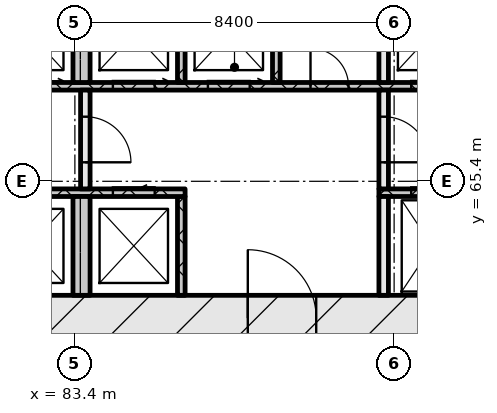
"""IFC4 building model, lengths in metres.
Left out: names, types, materials, properties, quantities, classifications, styles, units other than length and angle.
Written with IfcOpenShell. Run it as: python <this file> out.ifc"""

import sys

from ifc_helpers import new_model, si_unit, direction, frame, frame_2d, origin, place, context, subcontext, project, spatial, rectangle, extrude, element, fill, save


model = new_model("IFC4")
c1 = context("Model", 3, precision=1e-05, world=origin(), true_north=direction((0.0, 1.0)))
c2 = subcontext(c1, "Body", "Model", "MODEL_VIEW")
j1 = project(units=[si_unit("LENGTHUNIT", "METRE"), si_unit("PLANEANGLEUNIT", "RADIAN")], contexts=[c1])
p1 = place(None, origin())
s1 = spatial("IfcSite", under=j1, at=p1, CompositionType="ELEMENT")
p2 = place(p1, origin())
s2 = spatial("IfcBuilding", under=s1, at=p2, CompositionType="ELEMENT")
p3 = place(p2, origin())
s3 = spatial("IfcBuildingStorey", under=s2, at=p3, CompositionType="ELEMENT", Elevation=0.0)
p4 = place(p3, frame((66.6, 61.8, 0.0), z_axis=(0.0, 0.0, 1.0), x_axis=(1.0, 0.0, 0.0)))
e1 = element("IfcWall", 1, at=p4, inside=s3, PredefinedType="SOLIDWALL", context=c2, shape_type="SweptSolid", body=[
    extrude(rectangle(XDim=42.0, YDim=1.2, at=frame_2d((21.0, 0.0))), origin(), (0.0, 0.0, 1.0), 8.7),
])
p5 = place(p4, frame((21.35, 0.0, 0.0)))
e2 = element("IfcOpeningElement", 2, at=p5, cuts=e1, PredefinedType="OPENING", context=c2, shape_type="SweptSolid", body=[
    extrude(rectangle(XDim=1.8, YDim=2.1, at=frame_2d((0.9, 1.05))), frame((0.0, 0.61, 0.0), z_axis=(0.0, -1.0, 0.0), x_axis=(1.0, 0.0, 0.0)), (0.0, 0.0, 1.0), 1.22),
])
p6 = place(p3, frame((83.575, 62.4, 0.0), z_axis=(0.0, 0.0, 1.0), x_axis=(0.0, 1.0, 0.0)))
e3 = element("IfcWall", 3, at=p6, inside=s3, PredefinedType="SOLIDWALL", context=c2, shape_type="SweptSolid", body=[
    extrude(rectangle(XDim=2.6, YDim=0.45, at=frame_2d((1.3, 0.0))), origin(), (0.0, 0.0, 1.0), 8.7),
])
p7 = place(p3, frame((86.2, 62.4, 0.0), z_axis=(0.0, 0.0, 1.0), x_axis=(0.0, 1.0, 0.0)))
e4 = element("IfcWall", 4, at=p7, inside=s3, PredefinedType="SOLIDWALL", context=c2, shape_type="SweptSolid", body=[
    extrude(rectangle(XDim=2.6, YDim=0.2, at=frame_2d((1.3, 0.0))), origin(), (0.0, 0.0, 1.0), 8.7),
])
p8 = place(p3, frame((91.525, 62.4, 0.0), z_axis=(0.0, 0.0, 1.0), x_axis=(0.0, 1.0, 0.0)))
e5 = element("IfcWall", 5, at=p8, inside=s3, PredefinedType="SOLIDWALL", context=c2, shape_type="SweptSolid", body=[
    extrude(rectangle(XDim=2.6, YDim=0.25, at=frame_2d((1.3, 0.0))), origin(), (0.0, 0.0, 1.0), 8.7),
])
p9 = place(p3, frame((67.8, 65.1, 0.0), z_axis=(0.0, 0.0, 1.0), x_axis=(1.0, 0.0, 0.0)))
e6 = element("IfcWall", 6, at=p9, inside=s3, PredefinedType="SOLIDWALL", context=c2, shape_type="SweptSolid", body=[
    extrude(rectangle(XDim=18.5, YDim=0.2, at=frame_2d((9.25, 0.0))), origin(), (0.0, 0.0, 1.0), 8.7),
])
p10 = place(p9, frame((7.27, 0.0, 0.0)))
e7 = element("IfcOpeningElement", 7, at=p10, cuts=e6, PredefinedType="OPENING", context=c2, shape_type="SweptSolid", body=[
    extrude(rectangle(XDim=0.9, YDim=2.1, at=frame_2d((0.45, 1.05))), frame((0.0, 0.11, 0.0), z_axis=(0.0, -1.0, 0.0), x_axis=(1.0, 0.0, 0.0)), (0.0, 0.0, 1.0), 0.22),
])
p11 = place(p9, frame((8.85, 0.0, 0.0)))
e8 = element("IfcOpeningElement", 8, at=p11, cuts=e6, PredefinedType="OPENING", context=c2, shape_type="SweptSolid", body=[
    extrude(rectangle(XDim=1.1, YDim=2.1, at=frame_2d((0.55, 1.05))), frame((0.0, 0.11, 0.0), z_axis=(0.0, -1.0, 0.0), x_axis=(1.0, 0.0, 0.0)), (0.0, 0.0, 1.0), 0.22),
])
p12 = place(p9, frame((11.35, 0.0, 0.0)))
e9 = element("IfcOpeningElement", 9, at=p12, cuts=e6, PredefinedType="OPENING", context=c2, shape_type="SweptSolid", body=[
    extrude(rectangle(XDim=1.1, YDim=2.1, at=frame_2d((0.55, 1.05))), frame((0.0, 0.11, 0.0), z_axis=(0.0, -1.0, 0.0), x_axis=(1.0, 0.0, 0.0)), (0.0, 0.0, 1.0), 0.22),
])
p13 = place(p9, frame((13.85, 0.0, 0.0)))
e10 = element("IfcOpeningElement", 10, at=p13, cuts=e6, PredefinedType="OPENING", context=c2, shape_type="SweptSolid", body=[
    extrude(rectangle(XDim=1.1, YDim=2.1, at=frame_2d((0.55, 1.05))), frame((0.0, 0.11, 0.0), z_axis=(0.0, -1.0, 0.0), x_axis=(1.0, 0.0, 0.0)), (0.0, 0.0, 1.0), 0.22),
])
p14 = place(p9, frame((16.6, 0.0, 0.0)))
e11 = element("IfcOpeningElement", 11, at=p14, cuts=e6, PredefinedType="OPENING", context=c2, shape_type="SweptSolid", body=[
    extrude(rectangle(XDim=1.1, YDim=2.1, at=frame_2d((0.55, 1.05))), frame((0.0, 0.11, 0.0), z_axis=(0.0, -1.0, 0.0), x_axis=(1.0, 0.0, 0.0)), (0.0, 0.0, 1.0), 0.22),
])
p15 = place(p3, frame((91.4, 65.1, 0.0), z_axis=(0.0, 0.0, 1.0), x_axis=(1.0, 0.0, 0.0)))
e12 = element("IfcWall", 12, at=p15, inside=s3, PredefinedType="SOLIDWALL", context=c2, shape_type="SweptSolid", body=[
    extrude(rectangle(XDim=16.0, YDim=0.2, at=frame_2d((8.0, 0.0))), origin(), (0.0, 0.0, 1.0), 8.7),
])
p16 = place(p15, frame((0.85, 0.0, 0.0)))
e13 = element("IfcOpeningElement", 13, at=p16, cuts=e12, PredefinedType="OPENING", context=c2, shape_type="SweptSolid", body=[
    extrude(rectangle(XDim=1.1, YDim=2.1, at=frame_2d((0.55, 1.05))), frame((0.0, 0.11, 0.0), z_axis=(0.0, -1.0, 0.0), x_axis=(1.0, 0.0, 0.0)), (0.0, 0.0, 1.0), 0.22),
])
p17 = place(p15, frame((3.35, 0.0, 0.0)))
e14 = element("IfcOpeningElement", 14, at=p17, cuts=e12, PredefinedType="OPENING", context=c2, shape_type="SweptSolid", body=[
    extrude(rectangle(XDim=1.1, YDim=2.1, at=frame_2d((0.55, 1.05))), frame((0.0, 0.11, 0.0), z_axis=(0.0, -1.0, 0.0), x_axis=(1.0, 0.0, 0.0)), (0.0, 0.0, 1.0), 0.22),
])
p18 = place(p15, frame((5.85, 0.0, 0.0)))
e15 = element("IfcOpeningElement", 15, at=p18, cuts=e12, PredefinedType="OPENING", context=c2, shape_type="SweptSolid", body=[
    extrude(rectangle(XDim=1.1, YDim=2.1, at=frame_2d((0.55, 1.05))), frame((0.0, 0.11, 0.0), z_axis=(0.0, -1.0, 0.0), x_axis=(1.0, 0.0, 0.0)), (0.0, 0.0, 1.0), 0.22),
])
p19 = place(p15, frame((7.83, 0.0, 0.0)))
e16 = element("IfcOpeningElement", 16, at=p19, cuts=e12, PredefinedType="OPENING", context=c2, shape_type="SweptSolid", body=[
    extrude(rectangle(XDim=0.9, YDim=2.1, at=frame_2d((0.45, 1.05))), frame((0.0, 0.11, 0.0), z_axis=(0.0, -1.0, 0.0), x_axis=(1.0, 0.0, 0.0)), (0.0, 0.0, 1.0), 0.22),
])
p20 = place(p3, frame((83.675, 65.2, 0.0), z_axis=(0.0, 0.0, 1.0), x_axis=(0.0, 1.0, 0.0)))
e17 = element("IfcWall", 17, at=p20, inside=s3, PredefinedType="SOLIDWALL", context=c2, shape_type="SweptSolid", body=[
    extrude(rectangle(XDim=2.6, YDim=0.25, at=frame_2d((1.3, 0.0))), origin(), (0.0, 0.0, 1.0), 8.7),
])
p21 = place(p20, frame((0.7, 0.0, 0.0)))
e18 = element("IfcOpeningElement", 18, at=p21, cuts=e17, PredefinedType="OPENING", context=c2, shape_type="SweptSolid", body=[
    extrude(rectangle(XDim=1.2, YDim=2.1, at=frame_2d((0.6, 1.05))), frame((0.0, 0.135, 0.0), z_axis=(0.0, -1.0, 0.0), x_axis=(1.0, 0.0, 0.0)), (0.0, 0.0, 1.0), 0.27),
])
p22 = place(p3, frame((91.525, 65.2, 0.0), z_axis=(0.0, 0.0, 1.0), x_axis=(0.0, 1.0, 0.0)))
e19 = element("IfcWall", 19, at=p22, inside=s3, PredefinedType="SOLIDWALL", context=c2, shape_type="SweptSolid", body=[
    extrude(rectangle(XDim=2.6, YDim=0.25, at=frame_2d((1.3, 0.0))), origin(), (0.0, 0.0, 1.0), 8.7),
])
p23 = place(p22, frame((0.7, 0.0, 0.0)))
e20 = element("IfcOpeningElement", 20, at=p23, cuts=e19, PredefinedType="OPENING", context=c2, shape_type="SweptSolid", body=[
    extrude(rectangle(XDim=1.2, YDim=2.1, at=frame_2d((0.6, 1.05))), frame((0.0, 0.135, 0.0), z_axis=(0.0, -1.0, 0.0), x_axis=(1.0, 0.0, 0.0)), (0.0, 0.0, 1.0), 0.27),
])
p24 = place(p3, frame((76.05, 67.9, 0.0), z_axis=(0.0, 0.0, 1.0), x_axis=(1.0, 0.0, 0.0)))
e21 = element("IfcWall", 21, at=p24, inside=s3, PredefinedType="SOLIDWALL", context=c2, shape_type="SweptSolid", body=[
    extrude(rectangle(XDim=23.1, YDim=0.2, at=frame_2d((11.55, 0.0))), origin(), (0.0, 0.0, 1.0), 8.7),
])
p25 = place(p24, frame((0.6, 0.0, 0.0)))
e22 = element("IfcOpeningElement", 22, at=p25, cuts=e21, PredefinedType="OPENING", context=c2, shape_type="SweptSolid", body=[
    extrude(rectangle(XDim=1.1, YDim=2.1, at=frame_2d((0.55, 1.05))), frame((0.0, 0.11, 0.0), z_axis=(0.0, -1.0, 0.0), x_axis=(1.0, 0.0, 0.0)), (0.0, 0.0, 1.0), 0.22),
])
p26 = place(p24, frame((3.1, 0.0, 0.0)))
e23 = element("IfcOpeningElement", 23, at=p26, cuts=e21, PredefinedType="OPENING", context=c2, shape_type="SweptSolid", body=[
    extrude(rectangle(XDim=1.1, YDim=2.1, at=frame_2d((0.55, 1.05))), frame((0.0, 0.11, 0.0), z_axis=(0.0, -1.0, 0.0), x_axis=(1.0, 0.0, 0.0)), (0.0, 0.0, 1.0), 0.22),
])
p27 = place(p24, frame((5.6, 0.0, 0.0)))
e24 = element("IfcOpeningElement", 24, at=p27, cuts=e21, PredefinedType="OPENING", context=c2, shape_type="SweptSolid", body=[
    extrude(rectangle(XDim=1.1, YDim=2.1, at=frame_2d((0.55, 1.05))), frame((0.0, 0.11, 0.0), z_axis=(0.0, -1.0, 0.0), x_axis=(1.0, 0.0, 0.0)), (0.0, 0.0, 1.0), 0.22),
])
p28 = place(p24, frame((8.35, 0.0, 0.0)))
e25 = element("IfcOpeningElement", 25, at=p28, cuts=e21, PredefinedType="OPENING", context=c2, shape_type="SweptSolid", body=[
    extrude(rectangle(XDim=1.1, YDim=2.1, at=frame_2d((0.55, 1.05))), frame((0.0, 0.11, 0.0), z_axis=(0.0, -1.0, 0.0), x_axis=(1.0, 0.0, 0.0)), (0.0, 0.0, 1.0), 0.22),
])
p29 = place(p24, frame((10.85, 0.0, 0.0)))
e26 = element("IfcOpeningElement", 26, at=p29, cuts=e21, PredefinedType="OPENING", context=c2, shape_type="SweptSolid", body=[
    extrude(rectangle(XDim=1.1, YDim=2.1, at=frame_2d((0.55, 1.05))), frame((0.0, 0.11, 0.0), z_axis=(0.0, -1.0, 0.0), x_axis=(1.0, 0.0, 0.0)), (0.0, 0.0, 1.0), 0.22),
])
p30 = place(p24, frame((13.55, 0.0, 0.0)))
e27 = element("IfcOpeningElement", 27, at=p30, cuts=e21, PredefinedType="OPENING", context=c2, shape_type="SweptSolid", body=[
    extrude(rectangle(XDim=1.0, YDim=2.1, at=frame_2d((0.5, 1.05))), frame((0.0, 0.11, 0.0), z_axis=(0.0, -1.0, 0.0), x_axis=(1.0, 0.0, 0.0)), (0.0, 0.0, 1.0), 0.22),
])
p31 = place(p24, frame((16.2, 0.0, 0.0)))
e28 = element("IfcOpeningElement", 28, at=p31, cuts=e21, PredefinedType="OPENING", context=c2, shape_type="SweptSolid", body=[
    extrude(rectangle(XDim=1.1, YDim=2.1, at=frame_2d((0.55, 1.05))), frame((0.0, 0.11, 0.0), z_axis=(0.0, -1.0, 0.0), x_axis=(1.0, 0.0, 0.0)), (0.0, 0.0, 1.0), 0.22),
])
p32 = place(p24, frame((18.7, 0.0, 0.0)))
e29 = element("IfcOpeningElement", 29, at=p32, cuts=e21, PredefinedType="OPENING", context=c2, shape_type="SweptSolid", body=[
    extrude(rectangle(XDim=1.1, YDim=2.1, at=frame_2d((0.55, 1.05))), frame((0.0, 0.11, 0.0), z_axis=(0.0, -1.0, 0.0), x_axis=(1.0, 0.0, 0.0)), (0.0, 0.0, 1.0), 0.22),
])
p33 = place(p24, frame((21.2, 0.0, 0.0)))
e30 = element("IfcOpeningElement", 30, at=p33, cuts=e21, PredefinedType="OPENING", context=c2, shape_type="SweptSolid", body=[
    extrude(rectangle(XDim=1.1, YDim=2.1, at=frame_2d((0.55, 1.05))), frame((0.0, 0.11, 0.0), z_axis=(0.0, -1.0, 0.0), x_axis=(1.0, 0.0, 0.0)), (0.0, 0.0, 1.0), 0.22),
])
p34 = place(p3, frame((83.575, 68.0, 0.0), z_axis=(0.0, 0.0, 1.0), x_axis=(0.0, 1.0, 0.0)))
e31 = element("IfcWall", 31, at=p34, inside=s3, PredefinedType="SOLIDWALL", context=c2, shape_type="SweptSolid", body=[
    extrude(rectangle(XDim=2.6, YDim=0.45, at=frame_2d((1.3, 0.0))), origin(), (0.0, 0.0, 1.0), 8.7),
])
for number, where, z_axis, x_axis in (
    (32, (86.2, 68.0, 0.0), (0.0, 0.0, 1.0), (0.0, 1.0, 0.0)),
    (33, (88.7, 68.0, 0.0), (0.0, 0.0, 1.0), (0.0, 1.0, 0.0)),
):
    element("IfcWall", number, at=place(p3, frame(where, z_axis=z_axis, x_axis=x_axis)), inside=s3, PredefinedType="SOLIDWALL", context=c2, shape_type="SweptSolid", body=[
        extrude(rectangle(XDim=2.6, YDim=0.2, at=frame_2d((1.3, 0.0))), origin(), (0.0, 0.0, 1.0), 8.7),
    ])
p35 = place(p3, frame((91.525, 68.0, 0.0), z_axis=(0.0, 0.0, 1.0), x_axis=(0.0, 1.0, 0.0)))
e34 = element("IfcWall", 34, at=p35, inside=s3, PredefinedType="SOLIDWALL", context=c2, shape_type="SweptSolid", body=[
    extrude(rectangle(XDim=2.6, YDim=0.25, at=frame_2d((1.3, 0.0))), origin(), (0.0, 0.0, 1.0), 8.7),
])
p36 = place(p5, origin())
e35 = element("IfcDoor", 35, at=p36, inside=s3, OperationType="DOUBLE_DOOR_SINGLE_SWING", PredefinedType="DOOR", context=c2, shape_type="SweptSolid", body=[
    extrude(rectangle(XDim=1.8, YDim=2.1, at=frame_2d((0.9, 1.05))), frame((0.0, 0.025, 0.0), z_axis=(0.0, -1.0, 0.0), x_axis=(1.0, 0.0, 0.0)), (0.0, 0.0, 1.0), 0.05),
])
fill(e2, e35)
p37 = place(p14, origin())
e36 = element("IfcDoor", 36, at=p37, inside=s3, OperationType="SLIDING_TO_LEFT", PredefinedType="DOOR", context=c2, shape_type="SweptSolid", body=[
    extrude(rectangle(XDim=1.1, YDim=2.1, at=frame_2d((0.55, 1.05))), frame((0.0, 0.025, 0.0), z_axis=(0.0, -1.0, 0.0), x_axis=(1.0, 0.0, 0.0)), (0.0, 0.0, 1.0), 0.05),
])
fill(e11, e36)
p38 = place(p16, origin())
e37 = element("IfcDoor", 37, at=p38, inside=s3, OperationType="SLIDING_TO_LEFT", PredefinedType="DOOR", context=c2, shape_type="SweptSolid", body=[
    extrude(rectangle(XDim=1.1, YDim=2.1, at=frame_2d((0.55, 1.05))), frame((0.0, 0.025, 0.0), z_axis=(0.0, -1.0, 0.0), x_axis=(1.0, 0.0, 0.0)), (0.0, 0.0, 1.0), 0.05),
])
fill(e13, e37)
p39 = place(p21, origin())
e38 = element("IfcDoor", 38, at=p39, inside=s3, OperationType="SINGLE_SWING_RIGHT", PredefinedType="DOOR", context=c2, shape_type="SweptSolid", body=[
    extrude(rectangle(XDim=1.2, YDim=2.1, at=frame_2d((0.6, 1.05))), frame((0.0, 0.025, 0.0), z_axis=(0.0, -1.0, 0.0), x_axis=(1.0, 0.0, 0.0)), (0.0, 0.0, 1.0), 0.05),
])
fill(e18, e38)
p40 = place(p23, origin())
e39 = element("IfcDoor", 39, at=p40, inside=s3, OperationType="SINGLE_SWING_RIGHT", PredefinedType="DOOR", context=c2, shape_type="SweptSolid", body=[
    extrude(rectangle(XDim=1.2, YDim=2.1, at=frame_2d((0.6, 1.05))), frame((0.0, 0.025, 0.0), z_axis=(0.0, -1.0, 0.0), x_axis=(1.0, 0.0, 0.0)), (0.0, 0.0, 1.0), 0.05),
])
fill(e20, e39)
p41 = place(p28, origin())
e40 = element("IfcDoor", 40, at=p41, inside=s3, OperationType="SLIDING_TO_RIGHT", PredefinedType="DOOR", context=c2, shape_type="SweptSolid", body=[
    extrude(rectangle(XDim=1.1, YDim=2.1, at=frame_2d((0.55, 1.05))), frame((0.0, 0.025, 0.0), z_axis=(0.0, -1.0, 0.0), x_axis=(1.0, 0.0, 0.0)), (0.0, 0.0, 1.0), 0.05),
])
fill(e25, e40)
p42 = place(p29, origin())
e41 = element("IfcDoor", 41, at=p42, inside=s3, OperationType="SLIDING_TO_RIGHT", PredefinedType="DOOR", context=c2, shape_type="SweptSolid", body=[
    extrude(rectangle(XDim=1.1, YDim=2.1, at=frame_2d((0.55, 1.05))), frame((0.0, 0.025, 0.0), z_axis=(0.0, -1.0, 0.0), x_axis=(1.0, 0.0, 0.0)), (0.0, 0.0, 1.0), 0.05),
])
fill(e26, e41)
p43 = place(p30, origin())
e42 = element("IfcDoor", 42, at=p43, inside=s3, OperationType="SINGLE_SWING_LEFT", PredefinedType="DOOR", context=c2, shape_type="SweptSolid", body=[
    extrude(rectangle(XDim=1.0, YDim=2.1, at=frame_2d((0.5, 1.05))), frame((0.0, 0.025, 0.0), z_axis=(0.0, -1.0, 0.0), x_axis=(1.0, 0.0, 0.0)), (0.0, 0.0, 1.0), 0.05),
])
fill(e27, e42)
p44 = place(p31, origin())
e43 = element("IfcDoor", 43, at=p44, inside=s3, OperationType="SLIDING_TO_RIGHT", PredefinedType="DOOR", context=c2, shape_type="SweptSolid", body=[
    extrude(rectangle(XDim=1.1, YDim=2.1, at=frame_2d((0.55, 1.05))), frame((0.0, 0.025, 0.0), z_axis=(0.0, -1.0, 0.0), x_axis=(1.0, 0.0, 0.0)), (0.0, 0.0, 1.0), 0.05),
])
fill(e28, e43)
save(model, sys.argv[1])
